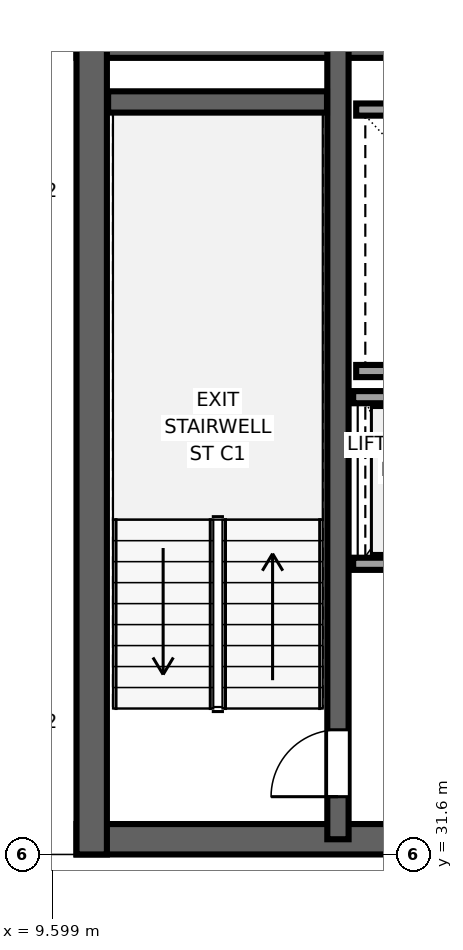
"""IFC4 building model, lengths in metres.
Left out: names, types, materials, properties, quantities, classifications, styles, units other than length and angle.
Written with IfcOpenShell. Run it as: python <this file> out.ifc"""

import sys

from ifc_helpers import new_model, si_unit, direction, frame, frame_2d, origin, place, context, subcontext, project, spatial, rectangle, extrude, source, transform, mapped, element, fill, save


model = new_model("IFC4")
c1 = context("Model", 3, precision=1e-05, world=origin(), true_north=direction((0.0, 1.0)))
c2 = subcontext(c1, "Body", "Model", "MODEL_VIEW")
j1 = project(units=[si_unit("LENGTHUNIT", "METRE"), si_unit("PLANEANGLEUNIT", "RADIAN")], contexts=[c1])
p1 = place(None, origin())
s1 = spatial("IfcSite", under=j1, at=p1, CompositionType="ELEMENT")
p2 = place(p1, origin())
s2 = spatial("IfcBuilding", under=s1, at=p2, CompositionType="ELEMENT")
p3 = place(p2, frame((0.0, 0.0, 262.95)))
s3 = spatial("IfcBuildingStorey", under=s2, at=p3, CompositionType="ELEMENT", Elevation=262.95)
p4 = place(p3, frame((10.0, 31.85, 0.0), z_axis=(0.0, 0.0, 1.0), x_axis=(1.0, 0.0, 0.0)))
e1 = element("IfcWall", 1, at=p4, inside=s3, PredefinedType="SHEAR", context=c2, shape_type="SweptSolid", body=[
    extrude(rectangle(XDim=26.0, YDim=0.5, at=frame_2d((13.0, 0.0))), origin(), (0.0, 0.0, 1.0), 3.55),
])
p5 = place(p4, frame((7.45, 0.0, 0.0), z_axis=(0.0, 0.0, 1.0), x_axis=(-1.0, 0.0, 0.0)))
e2 = element("IfcOpeningElement", 2, at=p5, cuts=e1, PredefinedType="OPENING", context=c2, shape_type="SweptSolid", body=[
    extrude(rectangle(XDim=1.5, YDim=2.04, at=frame_2d((0.75, 1.02))), frame((0.0, 0.26, 0.0), z_axis=(0.0, -1.0, 0.0), x_axis=(1.0, 0.0, 0.0)), (0.0, 0.0, 1.0), 0.52),
])
p6 = place(p4, frame((13.75, 0.0, 0.0), z_axis=(0.0, 0.0, 1.0), x_axis=(-1.0, 0.0, 0.0)))
e3 = element("IfcOpeningElement", 3, at=p6, cuts=e1, PredefinedType="OPENING", context=c2, shape_type="SweptSolid", body=[
    extrude(rectangle(XDim=1.5, YDim=2.04, at=frame_2d((0.75, 1.02))), frame((0.0, 0.26, 0.0), z_axis=(0.0, -1.0, 0.0), x_axis=(1.0, 0.0, 0.0)), (0.0, 0.0, 1.0), 0.52),
])
p7 = place(p4, frame((20.05, 0.0, 0.0), z_axis=(0.0, 0.0, 1.0), x_axis=(-1.0, 0.0, 0.0)))
e4 = element("IfcOpeningElement", 4, at=p7, cuts=e1, PredefinedType="OPENING", context=c2, shape_type="SweptSolid", body=[
    extrude(rectangle(XDim=1.5, YDim=2.04, at=frame_2d((0.75, 1.02))), frame((0.0, 0.26, 0.0), z_axis=(0.0, -1.0, 0.0), x_axis=(1.0, 0.0, 0.0)), (0.0, 0.0, 1.0), 0.52),
])
p8 = place(p3, frame((10.0, 44.95, 0.0), z_axis=(0.0, 0.0, 1.0), x_axis=(1.0, 0.0, 0.0)))
e5 = element("IfcWall", 5, at=p8, inside=s3, PredefinedType="SHEAR", context=c2, shape_type="SweptSolid", body=[
    extrude(rectangle(XDim=26.0, YDim=0.5, at=frame_2d((13.0, 0.0))), origin(), (0.0, 0.0, 1.0), 3.55),
])
p9 = place(p3, frame((10.25, 31.6, 0.0), z_axis=(0.0, 0.0, 1.0), x_axis=(0.0, 1.0, 0.0)))
e6 = element("IfcWall", 6, at=p9, inside=s3, PredefinedType="SHEAR", context=c2, shape_type="SweptSolid", body=[
    extrude(rectangle(XDim=13.6, YDim=0.5, at=frame_2d((6.8, 0.0))), origin(), (0.0, 0.0, 1.0), 3.55),
])
p10 = place(p3, frame((14.3, 31.85, 0.0), z_axis=(0.0, 0.0, 1.0), x_axis=(0.0, 1.0, 0.0)))
e7 = element("IfcWall", 7, at=p10, inside=s3, PredefinedType="SHEAR", context=c2, shape_type="SweptSolid", body=[
    extrude(rectangle(XDim=13.1, YDim=0.35, at=frame_2d((6.55, 0.0))), origin(), (0.0, 0.0, 1.0), 3.55),
])
p11 = place(p10, frame((0.7, 0.0, 0.0)))
e8 = element("IfcOpeningElement", 8, at=p11, cuts=e7, PredefinedType="OPENING", context=c2, shape_type="SweptSolid", body=[
    extrude(rectangle(XDim=1.1, YDim=2.12, at=frame_2d((0.55, 1.06))), frame((0.0, 0.185, 0.0), z_axis=(0.0, -1.0, 0.0), x_axis=(1.0, 0.0, 0.0)), (0.0, 0.0, 1.0), 0.37),
])
p12 = place(p3, frame((10.52, 43.975, 0.0), z_axis=(0.0, 0.0, 1.0), x_axis=(1.0, 0.0, 0.0)))
e9 = element("IfcWall", 9, at=p12, inside=s3, PredefinedType="SHEAR", context=c2, shape_type="SweptSolid", body=[
    extrude(rectangle(XDim=3.6, YDim=0.35, at=frame_2d((1.8, 0.0))), origin(), (0.0, 0.0, 1.0), 3.55),
])
for number, where, z_axis, x_axis in (
    (10, (14.6, 39.55, 0.0), (0.0, 0.0, 1.0), (1.0, 0.0, 0.0)),
    (11, (14.6, 43.85, 0.0), (0.0, 0.0, 1.0), (1.0, 0.0, 0.0)),
):
    element("IfcWall", number, at=place(p3, frame(where, z_axis=z_axis, x_axis=x_axis)), inside=s3, PredefinedType="SOLIDWALL", context=c2, shape_type="SweptSolid", body=[
        extrude(rectangle(XDim=4.1, YDim=0.2, at=frame_2d((2.05, 0.0))), origin(), (0.0, 0.0, 1.0), 3.37),
    ])
p13 = place(p3, frame((14.55, 36.38, 0.0), z_axis=(0.0, 0.0, 1.0), x_axis=(1.0, 0.0, 0.0)))
e12 = element("IfcWall", 12, at=p13, inside=s3, PredefinedType="SOLIDWALL", context=c2, shape_type="SweptSolid", body=[
    extrude(rectangle(XDim=4.075, YDim=0.2, at=frame_2d((2.038, 0.0))), origin(), (0.0, 0.0, 1.0), 3.37),
])
p14 = place(p13, frame((0.55, 0.0, 0.0)))
e13 = element("IfcOpeningElement", 13, at=p14, cuts=e12, PredefinedType="OPENING", context=c2, shape_type="SweptSolid", body=[
    extrude(rectangle(XDim=1.1, YDim=2.12, at=frame_2d((0.55, 1.06))), frame((0.0, 0.11, 0.0), z_axis=(0.0, -1.0, 0.0), x_axis=(1.0, 0.0, 0.0)), (0.0, 0.0, 1.0), 0.22),
])
p15 = place(p13, frame((2.45, 0.0, 0.0)))
e14 = element("IfcOpeningElement", 14, at=p15, cuts=e12, PredefinedType="OPENING", context=c2, shape_type="SweptSolid", body=[
    extrude(rectangle(XDim=1.1, YDim=2.12, at=frame_2d((0.55, 1.06))), frame((0.0, 0.11, 0.0), z_axis=(0.0, -1.0, 0.0), x_axis=(1.0, 0.0, 0.0)), (0.0, 0.0, 1.0), 0.22),
])
p16 = place(p3, frame((14.55, 39.12, 0.0), z_axis=(0.0, 0.0, 1.0), x_axis=(1.0, 0.0, 0.0)))
e15 = element("IfcWall", 15, at=p16, inside=s3, PredefinedType="SOLIDWALL", context=c2, shape_type="SweptSolid", body=[
    extrude(rectangle(XDim=4.075, YDim=0.2, at=frame_2d((2.038, 0.0))), origin(), (0.0, 0.0, 1.0), 3.37),
])
m1 = source(origin(), c2, "Body", "SweptSolid", [
    extrude(rectangle(XDim=1.1, YDim=2.12, at=frame_2d((0.55, 1.06))), frame((0.0, 0.025, 0.0), z_axis=(0.0, -1.0, 0.0), x_axis=(1.0, 0.0, 0.0)), (0.0, 0.0, 1.0), 0.05),
])
p17 = place(p11, origin())
e16 = element("IfcDoor", 16, at=p17, inside=s3, OperationType="SINGLE_SWING_LEFT", PredefinedType="DOOR", context=c2, shape_type="MappedRepresentation", body=[
    mapped(m1, transform((0.0, 0.0, 0.0), x_axis=(1.0, 0.0, 0.0), y_axis=(0.0, 1.0, 0.0), z_axis=(0.0, 0.0, 1.0), scale=1.0)),
])
fill(e8, e16)
save(model, sys.argv[1])
